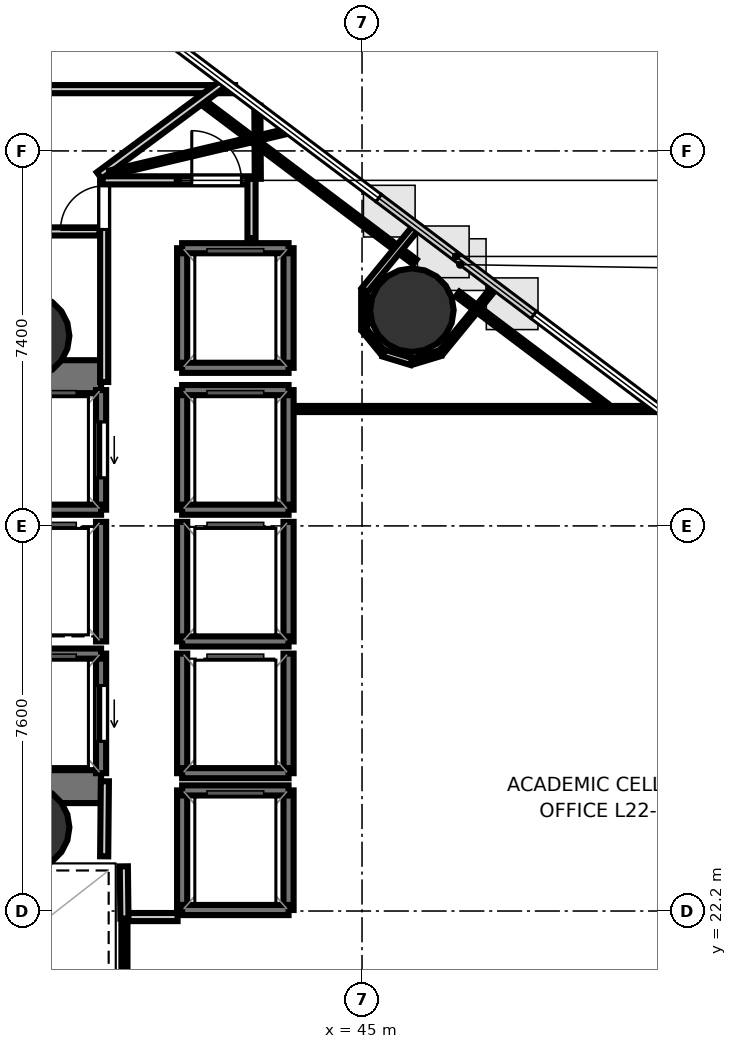
"""IFC4 building model, lengths in metres.
Left out: names, types, materials, properties, quantities, classifications, styles, units other than length and angle.
Written with IfcOpenShell. Run it as: python <this file> out.ifc"""

import sys

from ifc_helpers import new_model, si_unit, direction, frame, frame_2d, origin, origin_2d, place, context, subcontext, project, spatial, rectangle, hollow_circle, extrude, element, fill, save


model = new_model("IFC4")
c1 = context("Model", 3, precision=1e-05, world=origin(), true_north=direction((0.0, 1.0)))
c2 = subcontext(c1, "Body", "Model", "MODEL_VIEW")
j1 = project(units=[si_unit("LENGTHUNIT", "METRE"), si_unit("PLANEANGLEUNIT", "RADIAN")], contexts=[c1])
p1 = place(None, origin())
s1 = spatial("IfcSite", under=j1, at=p1, CompositionType="ELEMENT")
p2 = place(p1, origin())
s2 = spatial("IfcBuilding", under=s1, at=p2, CompositionType="ELEMENT")
p3 = place(p2, frame((0.0, 0.0, 89.5)))
s3 = spatial("IfcBuildingStorey", under=s2, at=p3, CompositionType="ELEMENT", Elevation=89.5)
p4 = place(p3, frame((29.13, 32.745, 0.0), z_axis=(0.0, 0.0, 1.0), x_axis=(1.0, 0.0, 0.0)))
e1 = element("IfcWall", 1, at=p4, inside=s3, PredefinedType="SHEAR", context=c2, shape_type="SweptSolid", body=[
    extrude(rectangle(XDim=10.72, YDim=0.65, at=frame_2d((5.36, 0.0))), origin(), (0.0, 0.0, 1.0), 3.4),
])
p5 = place(p4, frame((1.095, 0.0, 0.0)))
e2 = element("IfcOpeningElement", 2, at=p5, cuts=e1, PredefinedType="OPENING", context=c2, shape_type="SweptSolid", body=[
    extrude(rectangle(XDim=1.25, YDim=2.15, at=frame_2d((0.625, 1.075))), frame((0.0, 0.335, 0.0), z_axis=(0.0, -1.0, 0.0), x_axis=(1.0, 0.0, 0.0)), (0.0, 0.0, 1.0), 0.67),
])
p6 = place(p3, frame((29.13, 24.655, 0.0), z_axis=(0.0, 0.0, 1.0), x_axis=(1.0, 0.0, 0.0)))
e3 = element("IfcWall", 3, at=p6, inside=s3, PredefinedType="SHEAR", context=c2, shape_type="SweptSolid", body=[
    extrude(rectangle(XDim=10.72, YDim=0.65, at=frame_2d((5.36, 0.0))), origin(), (0.0, 0.0, 1.0), 3.4),
])
p7 = place(p6, frame((0.895, 0.0, 0.0)))
e4 = element("IfcOpeningElement", 4, at=p7, cuts=e3, PredefinedType="OPENING", context=c2, shape_type="SweptSolid", body=[
    extrude(rectangle(XDim=1.25, YDim=2.15, at=frame_2d((0.625, 1.075))), frame((0.0, 0.335, 0.0), z_axis=(0.0, -1.0, 0.0), x_axis=(1.0, 0.0, 0.0)), (0.0, 0.0, 1.0), 0.67),
])
for number, where, z_axis, x_axis in (
    (5, (38.4, 33.55, 0.0), (0.0, 0.0, 1.0), (1.0, 0.0, 0.0)),
    (6, (38.4, 23.85, 0.0), (0.0, 0.0, 1.0), (1.0, 0.0, 0.0)),
    (7, (45.984, 34.057, 0.0), (0.0, 0.0, 1.0), (1.0, 0.0, 0.0)),
):
    element("IfcColumn", number, at=place(p3, frame(where, z_axis=z_axis, x_axis=x_axis)), inside=s3, PredefinedType="COLUMN", context=c2, shape_type="SweptSolid", body=[
        extrude(hollow_circle(Radius=0.825, WallThickness=0.04, at=origin_2d()), origin(), (0.0, 0.0, 1.0), 3.7),
    ])
p8 = place(p3, frame((39.85, 30.12, 0.0), z_axis=(0.0, 0.0, 1.0), x_axis=(0.0, 1.0, 0.0)))
e8 = element("IfcWall", 8, at=p8, inside=s3, PredefinedType="SOLIDWALL", context=c2, shape_type="SweptSolid", body=[
    extrude(rectangle(XDim=2.36, YDim=0.2, at=frame_2d((1.18, 0.0))), origin(), (0.0, 0.0, 1.0), 3.4),
])
p9 = place(p8, frame((0.63, 0.0, 0.0)))
e9 = element("IfcOpeningElement", 9, at=p9, cuts=e8, PredefinedType="OPENING", context=c2, shape_type="SweptSolid", body=[
    extrude(rectangle(XDim=1.1, YDim=2.15, at=frame_2d((0.55, 1.075))), frame((0.0, 0.11, 0.0), z_axis=(0.0, -1.0, 0.0), x_axis=(1.0, 0.0, 0.0)), (0.0, 0.0, 1.0), 0.22),
])
p10 = place(p3, frame((37.75, 30.12, 0.0), z_axis=(0.0, 0.0, 1.0), x_axis=(1.0, 0.0, 0.0)))
e10 = element("IfcWall", 10, at=p10, inside=s3, PredefinedType="SOLIDWALL", context=c2, shape_type="SweptSolid", body=[
    extrude(rectangle(XDim=2.1, YDim=0.2, at=frame_2d((1.05, 0.0))), origin(), (0.0, 0.0, 1.0), 3.4),
])
p11 = place(p3, frame((39.85, 24.92, 0.0), z_axis=(0.0, 0.0, 1.0), x_axis=(0.0, 1.0, 0.0)))
e11 = element("IfcWall", 11, at=p11, inside=s3, PredefinedType="SOLIDWALL", context=c2, shape_type="SweptSolid", body=[
    extrude(rectangle(XDim=2.36, YDim=0.2, at=frame_2d((1.18, 0.0))), origin(), (0.0, 0.0, 1.0), 3.4),
])
p12 = place(p11, frame((0.63, 0.0, 0.0)))
e12 = element("IfcOpeningElement", 12, at=p12, cuts=e11, PredefinedType="OPENING", context=c2, shape_type="SweptSolid", body=[
    extrude(rectangle(XDim=1.1, YDim=2.15, at=frame_2d((0.55, 1.075))), frame((0.0, 0.11, 0.0), z_axis=(0.0, -1.0, 0.0), x_axis=(1.0, 0.0, 0.0)), (0.0, 0.0, 1.0), 0.22),
])
p13 = place(p3, frame((37.75, 27.28, 0.0), z_axis=(0.0, 0.0, 1.0), x_axis=(1.0, 0.0, 0.0)))
e13 = element("IfcWall", 13, at=p13, inside=s3, PredefinedType="SOLIDWALL", context=c2, shape_type="SweptSolid", body=[
    extrude(rectangle(XDim=2.1, YDim=0.2, at=frame_2d((1.05, 0.0))), origin(), (0.0, 0.0, 1.0), 3.4),
])
for number, where, z_axis, x_axis in (
    (14, (43.55, 30.12, 0.0), (0.0, 0.0, 1.0), (0.0, 1.0, 0.0)),
    (15, (41.45, 30.12, 0.0), (0.0, 0.0, 1.0), (0.0, 1.0, 0.0)),
):
    element("IfcWall", number, at=place(p3, frame(where, z_axis=z_axis, x_axis=x_axis)), inside=s3, PredefinedType="SOLIDWALL", context=c2, shape_type="SweptSolid", body=[
        extrude(rectangle(XDim=2.36, YDim=0.2, at=frame_2d((1.18, 0.0))), origin(), (0.0, 0.0, 1.0), 3.4),
    ])
for number, where, z_axis, x_axis in (
    (16, (41.45, 32.48, 0.0), (0.0, 0.0, 1.0), (1.0, 0.0, 0.0)),
    (17, (41.45, 30.12, 0.0), (0.0, 0.0, 1.0), (1.0, 0.0, 0.0)),
):
    element("IfcWall", number, at=place(p3, frame(where, z_axis=z_axis, x_axis=x_axis)), inside=s3, PredefinedType="SOLIDWALL", context=c2, shape_type="SweptSolid", body=[
        extrude(rectangle(XDim=2.1, YDim=0.2, at=frame_2d((1.05, 0.0))), origin(), (0.0, 0.0, 1.0), 3.4),
    ])
for number, where, z_axis, x_axis in (
    (18, (43.55, 27.52, 0.0), (0.0, 0.0, 1.0), (0.0, 1.0, 0.0)),
    (19, (41.45, 27.52, 0.0), (0.0, 0.0, 1.0), (0.0, 1.0, 0.0)),
):
    element("IfcWall", number, at=place(p3, frame(where, z_axis=z_axis, x_axis=x_axis)), inside=s3, PredefinedType="SOLIDWALL", context=c2, shape_type="SweptSolid", body=[
        extrude(rectangle(XDim=2.36, YDim=0.2, at=frame_2d((1.18, 0.0))), origin(), (0.0, 0.0, 1.0), 3.4),
    ])
p14 = place(p3, frame((41.45, 27.52, 0.0), z_axis=(0.0, 0.0, 1.0), x_axis=(1.0, 0.0, 0.0)))
e20 = element("IfcWall", 20, at=p14, inside=s3, PredefinedType="SOLIDWALL", context=c2, shape_type="SweptSolid", body=[
    extrude(rectangle(XDim=2.1, YDim=0.2, at=frame_2d((1.05, 0.0))), origin(), (0.0, 0.0, 1.0), 3.4),
])
for number, where, z_axis, x_axis in (
    (21, (43.55, 24.92, 0.0), (0.0, 0.0, 1.0), (0.0, 1.0, 0.0)),
    (22, (41.45, 24.92, 0.0), (0.0, 0.0, 1.0), (0.0, 1.0, 0.0)),
):
    element("IfcWall", number, at=place(p3, frame(where, z_axis=z_axis, x_axis=x_axis)), inside=s3, PredefinedType="SOLIDWALL", context=c2, shape_type="SweptSolid", body=[
        extrude(rectangle(XDim=2.36, YDim=0.2, at=frame_2d((1.18, 0.0))), origin(), (0.0, 0.0, 1.0), 3.4),
    ])
p15 = place(p3, frame((41.45, 24.92, 0.0), z_axis=(0.0, 0.0, 1.0), x_axis=(1.0, 0.0, 0.0)))
e23 = element("IfcWall", 23, at=p15, inside=s3, PredefinedType="SOLIDWALL", context=c2, shape_type="SweptSolid", body=[
    extrude(rectangle(XDim=2.1, YDim=0.2, at=frame_2d((1.05, 0.0))), origin(), (0.0, 0.0, 1.0), 3.4),
])
p16 = place(p3, frame((39.85, 27.52, 0.0), z_axis=(0.0, 0.0, 1.0), x_axis=(0.0, 1.0, 0.0)))
e24 = element("IfcWall", 24, at=p16, inside=s3, PredefinedType="SOLIDWALL", context=c2, shape_type="SweptSolid", body=[
    extrude(rectangle(XDim=2.36, YDim=0.2, at=frame_2d((1.18, 0.0))), origin(), (0.0, 0.0, 1.0), 3.4),
])
for number, where, z_axis, x_axis in (
    (25, (43.55, 22.22, 0.0), (0.0, 0.0, 1.0), (0.0, 1.0, 0.0)),
    (26, (41.45, 22.22, 0.0), (0.0, 0.0, 1.0), (0.0, 1.0, 0.0)),
):
    element("IfcWall", number, at=place(p3, frame(where, z_axis=z_axis, x_axis=x_axis)), inside=s3, PredefinedType="SOLIDWALL", context=c2, shape_type="SweptSolid", body=[
        extrude(rectangle(XDim=2.36, YDim=0.2, at=frame_2d((1.18, 0.0))), origin(), (0.0, 0.0, 1.0), 3.4),
    ])
for number, where, z_axis, x_axis in (
    (27, (41.45, 24.58, 0.0), (0.0, 0.0, 1.0), (1.0, 0.0, 0.0)),
    (28, (41.45, 22.22, 0.0), (0.0, 0.0, 1.0), (1.0, 0.0, 0.0)),
):
    element("IfcWall", number, at=place(p3, frame(where, z_axis=z_axis, x_axis=x_axis)), inside=s3, PredefinedType="SOLIDWALL", context=c2, shape_type="SweptSolid", body=[
        extrude(rectangle(XDim=2.1, YDim=0.2, at=frame_2d((1.05, 0.0))), origin(), (0.0, 0.0, 1.0), 3.4),
    ])
for number, where, z_axis, x_axis in (
    (29, (43.55, 32.92, 0.0), (0.0, 0.0, 1.0), (0.0, 1.0, 0.0)),
    (30, (41.45, 32.92, 0.0), (0.0, 0.0, 1.0), (0.0, 1.0, 0.0)),
):
    element("IfcWall", number, at=place(p3, frame(where, z_axis=z_axis, x_axis=x_axis)), inside=s3, PredefinedType="SOLIDWALL", context=c2, shape_type="SweptSolid", body=[
        extrude(rectangle(XDim=2.36, YDim=0.2, at=frame_2d((1.18, 0.0))), origin(), (0.0, 0.0, 1.0), 3.4),
    ])
for number, where, z_axis, x_axis in (
    (31, (41.45, 35.28, 0.0), (0.0, 0.0, 1.0), (1.0, 0.0, 0.0)),
    (32, (41.45, 32.92, 0.0), (0.0, 0.0, 1.0), (1.0, 0.0, 0.0)),
):
    element("IfcWall", number, at=place(p3, frame(where, z_axis=z_axis, x_axis=x_axis)), inside=s3, PredefinedType="SOLIDWALL", context=c2, shape_type="SweptSolid", body=[
        extrude(rectangle(XDim=2.1, YDim=0.2, at=frame_2d((1.05, 0.0))), origin(), (0.0, 0.0, 1.0), 3.4),
    ])
p17 = place(p3, frame((39.911, 32.64, 0.0), z_axis=(0.0, 0.0, 1.0), x_axis=(0.0, 1.0, 0.0)))
e33 = element("IfcWall", 33, at=p17, inside=s3, PredefinedType="PARTITIONING", context=c2, shape_type="SweptSolid", body=[
    extrude(rectangle(XDim=4.01, YDim=0.16, at=frame_2d((2.005, 0.0))), origin(), (0.0, 0.0, 1.0), 2.72),
])
p18 = place(p17, frame((3.01, 0.0, 0.0)))
e34 = element("IfcOpeningElement", 34, at=p18, cuts=e33, PredefinedType="OPENING", context=c2, shape_type="SweptSolid", body=[
    extrude(rectangle(XDim=0.86, YDim=2.05, at=frame_2d((0.43, 1.025))), frame((0.0, 0.09, 0.0), z_axis=(0.0, -1.0, 0.0), x_axis=(1.0, 0.0, 0.0)), (0.0, 0.0, 1.0), 0.18),
])
p19 = place(p3, frame((39.88, 36.619, 0.0), z_axis=(0.0, 0.0, 1.0), x_axis=(1.0, 0.0, 0.0)))
e35 = element("IfcWall", 35, at=p19, inside=s3, PredefinedType="PARTITIONING", context=c2, shape_type="SweptSolid", body=[
    extrude(rectangle(XDim=2.97, YDim=0.16, at=frame_2d((1.485, 0.0))), origin(), (0.0, 0.0, 1.0), 2.678),
])
p20 = place(p19, frame((1.76, 0.0, 0.0)))
e36 = element("IfcOpeningElement", 36, at=p20, cuts=e35, PredefinedType="OPENING", context=c2, shape_type="SweptSolid", body=[
    extrude(rectangle(XDim=0.98, YDim=2.1, at=frame_2d((0.49, 1.05))), frame((0.0, 0.09, 0.0), z_axis=(0.0, -1.0, 0.0), x_axis=(1.0, 0.0, 0.0)), (0.0, 0.0, 1.0), 0.18),
])
p21 = place(p3, frame((42.819, 36.65, 0.0), z_axis=(0.0, 0.0, 1.0), x_axis=(0.0, -1.0, 0.0)))
e37 = element("IfcWall", 37, at=p21, inside=s3, PredefinedType="PARTITIONING", context=c2, shape_type="SweptSolid", body=[
    extrude(rectangle(XDim=1.17, YDim=0.16, at=frame_2d((0.585, 0.0))), origin(), (0.0, 0.0, 1.0), 2.678),
])
p22 = place(p3, frame((41.36, 22.081, 0.0), z_axis=(0.0, 0.0, 1.0), x_axis=(-1.0, 0.0, 0.0)))
e38 = element("IfcWall", 38, at=p22, inside=s3, PredefinedType="PARTITIONING", context=c2, shape_type="SweptSolid", body=[
    extrude(rectangle(XDim=1.08, YDim=0.16, at=frame_2d((0.54, 0.0))), origin(), (0.0, 0.0, 1.0), 2.72),
])
p23 = place(p3, frame((40.311, 22.05, 0.0), z_axis=(0.0, 0.0, 1.0), x_axis=(-0.011836292006, 0.999929948642, 0.0)))
e39 = element("IfcWall", 39, at=p23, inside=s3, PredefinedType="PARTITIONING", context=c2, shape_type="SweptSolid", body=[
    extrude(rectangle(XDim=1.031, YDim=0.16, at=frame_2d((0.516, 0.0))), origin(), (0.0, 0.0, 1.0), 2.72),
])
p24 = place(p3, frame((39.911, 23.28, 0.0), z_axis=(0.0, 0.0, 1.0), x_axis=(0.009397771291, 0.999955839972, 0.0)))
e40 = element("IfcWall", 40, at=p24, inside=s3, PredefinedType="PARTITIONING", context=c2, shape_type="SweptSolid", body=[
    extrude(rectangle(XDim=1.481, YDim=0.16, at=frame_2d((0.74, 0.0))), origin(), (0.0, 0.0, 1.0), 2.72),
])
p25 = place(p3, frame((26.42, 38.419, 0.0), z_axis=(0.0, 0.0, 1.0), x_axis=(1.0, 0.0, 0.0)))
e41 = element("IfcWall", 41, at=p25, inside=s3, PredefinedType="PARTITIONING", context=c2, shape_type="SweptSolid", body=[
    extrude(rectangle(XDim=16.075, YDim=0.16, at=frame_2d((8.037, 0.0))), origin(), (0.0, 0.0, 1.0), 2.678),
])
p26 = place(p25, frame((7.13, 0.0, 0.0)))
e42 = element("IfcOpeningElement", 42, at=p26, cuts=e41, PredefinedType="OPENING", context=c2, shape_type="SweptSolid", body=[
    extrude(rectangle(XDim=0.9, YDim=2.1, at=frame_2d((0.45, 1.05))), frame((0.0, 0.09, 0.0), z_axis=(0.0, -1.0, 0.0), x_axis=(1.0, 0.0, 0.0)), (0.0, 0.0, 1.0), 0.18),
])
p27 = place(p3, frame((42.309, 38.568, 0.0), z_axis=(0.0, 0.0, 1.0), x_axis=(-0.802734180395, -0.596337015139, 0.0)))
e43 = element("IfcWall", 43, at=p27, inside=s3, PredefinedType="PARTITIONING", context=c2, shape_type="SweptSolid", body=[
    extrude(rectangle(XDim=3.109, YDim=0.16, at=frame_2d((1.554, 0.0))), origin(), (0.0, 0.0, 1.0), 2.678),
])
p28 = place(p3, frame((39.818, 35.611, 0.0), z_axis=(0.0, 0.0, 1.0), x_axis=(-1.0, 0.0, 0.0)))
e44 = element("IfcWall", 44, at=p28, inside=s3, PredefinedType="PARTITIONING", context=c2, shape_type="SweptSolid", body=[
    extrude(rectangle(XDim=2.768, YDim=0.16, at=frame_2d((1.384, 0.0))), origin(), (0.0, 0.0, 1.0), 2.72),
])
p29 = place(p3, frame((40.311, 18.0, 0.0), z_axis=(0.0, 0.0, 1.0), x_axis=(0.0, 1.0, 0.0)))
e45 = element("IfcWall", 45, at=p29, inside=s3, PredefinedType="PARTITIONING", context=c2, shape_type="SweptSolid", body=[
    extrude(rectangle(XDim=3.97, YDim=0.12, at=frame_2d((1.985, 0.0))), origin(), (0.0, 0.0, 1.0), 2.72),
])
p30 = place(p3, frame((43.72, 32.107, 0.0), z_axis=(0.0, 0.0, 1.0), x_axis=(1.0, 0.0, 0.0)))
e46 = element("IfcWall", 46, at=p30, inside=s3, PredefinedType="PARTITIONING", context=c2, shape_type="SweptSolid", body=[
    extrude(rectangle(XDim=7.153, YDim=0.12, at=frame_2d((3.577, 0.0))), origin(), (0.0, 0.0, 1.0), 2.678),
])
p31 = place(p3, frame((42.943, 36.65, 0.0), z_axis=(0.0, 0.0, 1.0), x_axis=(-0.005924066662, 0.999982452563, 0.0)))
e47 = element("IfcWall", 47, at=p31, inside=s3, PredefinedType="PARTITIONING", context=c2, shape_type="SweptSolid", body=[
    extrude(rectangle(XDim=1.442, YDim=0.12, at=frame_2d((0.721, 0.0))), origin(), (0.0, 0.0, 1.0), 2.72),
])
p32 = place(p3, frame((43.565, 37.598, 0.0), z_axis=(0.0, 0.0, 1.0), x_axis=(-0.973223353469, -0.229861489299, 0.0)))
e48 = element("IfcWall", 48, at=p32, inside=s3, PredefinedType="PARTITIONING", context=c2, shape_type="SweptSolid", body=[
    extrude(rectangle(XDim=3.641, YDim=0.105, at=frame_2d((1.82, 0.0))), origin(), (0.0, 0.0, 1.0), 2.678),
])
p33 = place(p3, frame((41.908, 38.125, 0.0), z_axis=(0.0, 0.0, 1.0), x_axis=(0.798702253017, -0.60172644202, 0.0)))
e49 = element("IfcWall", 49, at=p33, inside=s3, PredefinedType="PARTITIONING", context=c2, shape_type="SweptSolid", body=[
    extrude(rectangle(XDim=5.177, YDim=0.12, at=frame_2d((2.589, 0.0))), origin(), (0.0, 0.0, 1.0), 2.72),
])
p34 = place(p3, frame((46.09, 35.721, 0.0), z_axis=(0.0, 0.0, 1.0), x_axis=(-0.634275522156, -0.773107083135, 0.0)))
e50 = element("IfcWall", 50, at=p34, inside=s3, PredefinedType="PARTITIONING", context=c2, shape_type="SweptSolid", body=[
    extrude(rectangle(XDim=1.639, YDim=0.14, at=frame_2d((0.819, 0.0))), origin(), (0.0, 0.0, 1.0), 2.678),
])
p35 = place(p3, frame((45.043, 34.434, 0.0), z_axis=(0.0, 0.0, 1.0), x_axis=(0.0, -1.0, 0.0)))
e51 = element("IfcWall", 51, at=p35, inside=s3, PredefinedType="PARTITIONING", context=c2, shape_type="SweptSolid", body=[
    extrude(rectangle(XDim=0.754, YDim=0.12, at=frame_2d((0.377, 0.0))), origin(), (0.0, 0.0, 1.0), 2.72),
])
p36 = place(p3, frame((45.05, 33.66, 0.0), z_axis=(0.0, 0.0, 1.0), x_axis=(0.634329694458, -0.773062635709, 0.0)))
e52 = element("IfcWall", 52, at=p36, inside=s3, PredefinedType="PARTITIONING", context=c2, shape_type="SweptSolid", body=[
    extrude(rectangle(XDim=0.572, YDim=0.105, at=frame_2d((0.286, 0.0))), origin(), (0.0, 0.0, 1.0), 2.72),
])
p37 = place(p3, frame((45.428, 33.208, 0.0), z_axis=(0.0, 0.0, 1.0), x_axis=(0.956952578659, -0.290244314669, 0.0)))
e53 = element("IfcWall", 53, at=p37, inside=s3, PredefinedType="PARTITIONING", context=c2, shape_type="SweptSolid", body=[
    extrude(rectangle(XDim=0.572, YDim=0.14, at=frame_2d((0.286, 0.0))), origin(), (0.0, 0.0, 1.0), 2.72),
])
p38 = place(p3, frame((45.993, 33.042, 0.0), z_axis=(0.0, 0.0, 1.0), x_axis=(0.956952578659, 0.290244314669, 0.0)))
e54 = element("IfcWall", 54, at=p38, inside=s3, PredefinedType="PARTITIONING", context=c2, shape_type="SweptSolid", body=[
    extrude(rectangle(XDim=0.572, YDim=0.12, at=frame_2d((0.286, 0.0))), origin(), (0.0, 0.0, 1.0), 2.678),
])
p39 = place(p3, frame((46.555, 33.218, 0.0), z_axis=(0.0, 0.0, 1.0), x_axis=(0.634357939729, 0.773039458439, 0.0)))
e55 = element("IfcWall", 55, at=p39, inside=s3, PredefinedType="PARTITIONING", context=c2, shape_type="SweptSolid", body=[
    extrude(rectangle(XDim=1.72, YDim=0.105, at=frame_2d((0.86, 0.0))), origin(), (0.0, 0.0, 1.0), 2.678),
])
p40 = place(p3, frame((46.886, 34.375, 0.0), z_axis=(0.0, 0.0, 1.0), x_axis=(0.798755968832, -0.60165513565, 0.0)))
e56 = element("IfcWall", 56, at=p40, inside=s3, PredefinedType="PARTITIONING", context=c2, shape_type="SweptSolid", body=[
    extrude(rectangle(XDim=3.655, YDim=0.12, at=frame_2d((1.828, 0.0))), origin(), (0.0, 0.0, 1.0), 2.678),
])
p41 = place(p9, origin())
e57 = element("IfcDoor", 57, at=p41, inside=s3, OperationType="SLIDING_TO_LEFT", PredefinedType="DOOR", context=c2, shape_type="SweptSolid", body=[
    extrude(rectangle(XDim=1.1, YDim=2.15, at=frame_2d((0.55, 1.075))), frame((0.0, 0.025, 0.0), z_axis=(0.0, -1.0, 0.0), x_axis=(1.0, 0.0, 0.0)), (0.0, 0.0, 1.0), 0.05),
])
fill(e9, e57)
p42 = place(p12, origin())
e58 = element("IfcDoor", 58, at=p42, inside=s3, OperationType="SLIDING_TO_LEFT", PredefinedType="DOOR", context=c2, shape_type="SweptSolid", body=[
    extrude(rectangle(XDim=1.1, YDim=2.15, at=frame_2d((0.55, 1.075))), frame((0.0, 0.025, 0.0), z_axis=(0.0, -1.0, 0.0), x_axis=(1.0, 0.0, 0.0)), (0.0, 0.0, 1.0), 0.05),
])
fill(e12, e58)
p43 = place(p18, origin())
e59 = element("IfcDoor", 59, at=p43, inside=s3, OperationType="SINGLE_SWING_LEFT", PredefinedType="DOOR", context=c2, shape_type="SweptSolid", body=[
    extrude(rectangle(XDim=0.86, YDim=2.05, at=frame_2d((0.43, 1.025))), frame((0.0, 0.025, 0.0), z_axis=(0.0, -1.0, 0.0), x_axis=(1.0, 0.0, 0.0)), (0.0, 0.0, 1.0), 0.05),
])
fill(e34, e59)
p44 = place(p20, origin())
e60 = element("IfcDoor", 60, at=p44, inside=s3, OperationType="SINGLE_SWING_LEFT", PredefinedType="DOOR", context=c2, shape_type="SweptSolid", body=[
    extrude(rectangle(XDim=0.98, YDim=2.1, at=frame_2d((0.49, 1.05))), frame((0.0, 0.025, 0.0), z_axis=(0.0, -1.0, 0.0), x_axis=(1.0, 0.0, 0.0)), (0.0, 0.0, 1.0), 0.05),
])
fill(e36, e60)
save(model, sys.argv[1])
